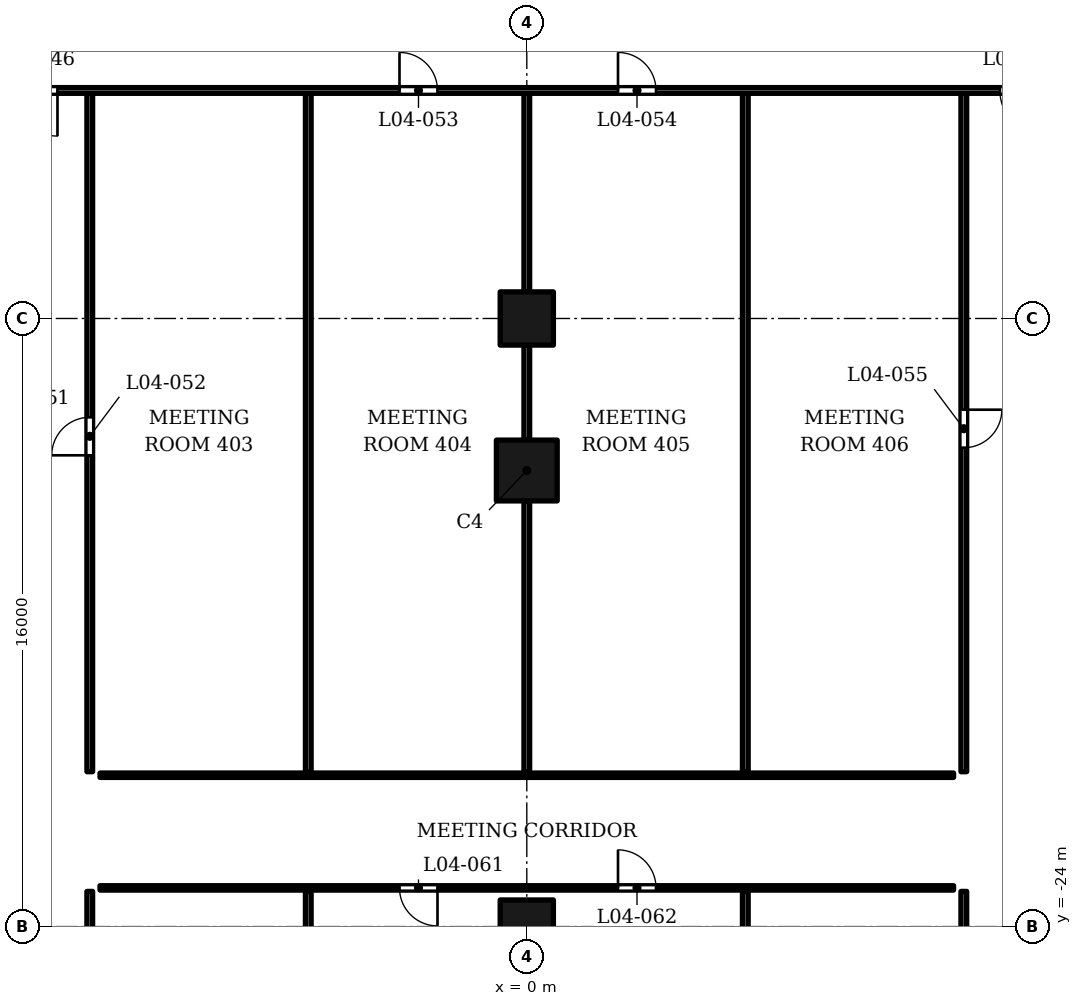
"""IFC4 building model, lengths in metres.
Left out: names, types, materials, properties, quantities, classifications, styles, units other than length and angle.
Written with IfcOpenShell. Run it as: python <this file> out.ifc"""

import sys

from ifc_helpers import new_model, si_unit, direction, frame, frame_2d, origin, origin_2d, place, context, subcontext, project, spatial, rectangle, extrude, element, fill, save


model = new_model("IFC4")
c1 = context("Model", 3, precision=1e-05, world=origin(), true_north=direction((0.0, 1.0)))
c2 = subcontext(c1, "Body", "Model", "MODEL_VIEW")
j1 = project(units=[si_unit("LENGTHUNIT", "METRE"), si_unit("PLANEANGLEUNIT", "RADIAN")], contexts=[c1])
p1 = place(None, origin())
s1 = spatial("IfcSite", under=j1, at=p1, CompositionType="ELEMENT")
p2 = place(p1, origin())
s2 = spatial("IfcBuilding", under=s1, at=p2, CompositionType="ELEMENT")
p3 = place(p2, frame((0.0, 0.0, 34.5)))
s3 = spatial("IfcBuildingStorey", under=s2, at=p3, CompositionType="ELEMENT", Elevation=34.5)
for number, where, z_axis, x_axis in (
    (1, (0.0, -24.0, 0.0), (0.0, 0.0, 1.0), (1.0, 0.0, 0.0)),
    (2, (0.0, -8.0, 0.0), (0.0, 0.0, 1.0), (1.0, 0.0, 0.0)),
):
    element("IfcColumn", number, at=place(p3, frame(where, z_axis=z_axis, x_axis=x_axis)), inside=s3, PredefinedType="COLUMN", context=c2, shape_type="SweptSolid", body=[
        extrude(rectangle(XDim=1.4, YDim=1.4, at=origin_2d()), origin(), (0.0, 0.0, 1.0), 5.5),
    ])
p4 = place(p3, frame((0.0, -12.0, 0.0), z_axis=(0.0, 0.0, 1.0), x_axis=(1.0, 0.0, 0.0)))
e3 = element("IfcColumn", 3, at=p4, inside=s3, PredefinedType="COLUMN", context=c2, shape_type="SweptSolid", body=[
    extrude(rectangle(XDim=1.6, YDim=1.6, at=origin_2d()), origin(), (0.0, 0.0, 1.0), 5.5),
])
p5 = place(p3, frame((-11.5, -43.72, 0.0), z_axis=(0.0, 0.0, 1.0), x_axis=(0.0, 1.0, 0.0)))
e4 = element("IfcWall", 4, at=p5, inside=s3, PredefinedType="PARTITIONING", context=c2, shape_type="SweptSolid", body=[
    extrude(rectangle(XDim=20.645, YDim=0.15, at=frame_2d((10.323, 0.0))), origin(), (0.0, 0.0, 1.0), 3.85),
])
p6 = place(p5, frame((9.87, 0.0, 0.0)))
e5 = element("IfcOpeningElement", 5, at=p6, cuts=e4, PredefinedType="OPENING", context=c2, shape_type="SweptSolid", body=[
    extrude(rectangle(XDim=1.0, YDim=2.1, at=frame_2d((0.5, 1.05))), frame((0.0, 0.085, 0.0), z_axis=(0.0, -1.0, 0.0), x_axis=(1.0, 0.0, 0.0)), (0.0, 0.0, 1.0), 0.17),
])
for number, where, z_axis, x_axis in (
    (6, (-5.75, -43.72, 0.0), (0.0, 0.0, 1.0), (0.0, 1.0, 0.0)),
    (7, (5.75, -43.72, 0.0), (0.0, 0.0, 1.0), (0.0, 1.0, 0.0)),
):
    element("IfcWall", number, at=place(p3, frame(where, z_axis=z_axis, x_axis=x_axis)), inside=s3, PredefinedType="PARTITIONING", context=c2, shape_type="SweptSolid", body=[
        extrude(rectangle(XDim=20.645, YDim=0.15, at=frame_2d((10.323, 0.0))), origin(), (0.0, 0.0, 1.0), 3.85),
    ])
p7 = place(p3, frame((11.5, -43.72, 0.0), z_axis=(0.0, 0.0, 1.0), x_axis=(0.0, 1.0, 0.0)))
e8 = element("IfcWall", 8, at=p7, inside=s3, PredefinedType="PARTITIONING", context=c2, shape_type="SweptSolid", body=[
    extrude(rectangle(XDim=20.645, YDim=0.15, at=frame_2d((10.323, 0.0))), origin(), (0.0, 0.0, 1.0), 3.85),
])
p8 = place(p7, frame((9.82, 0.0, 0.0)))
e9 = element("IfcOpeningElement", 9, at=p8, cuts=e8, PredefinedType="OPENING", context=c2, shape_type="SweptSolid", body=[
    extrude(rectangle(XDim=1.0, YDim=2.1, at=frame_2d((0.5, 1.05))), frame((0.0, 0.085, 0.0), z_axis=(0.0, -1.0, 0.0), x_axis=(1.0, 0.0, 0.0)), (0.0, 0.0, 1.0), 0.17),
])
p9 = place(p3, frame((-11.23, -22.982, 0.0), z_axis=(0.0, 0.0, 1.0), x_axis=(1.0, 0.0, 0.0)))
e10 = element("IfcWall", 10, at=p9, inside=s3, PredefinedType="PARTITIONING", context=c2, shape_type="SweptSolid", body=[
    extrude(rectangle(XDim=22.46, YDim=0.115, at=frame_2d((11.23, 0.0))), origin(), (0.0, 0.0, 1.0), 3.85),
])
p10 = place(p9, frame((7.88, 0.0, 0.0)))
e11 = element("IfcOpeningElement", 11, at=p10, cuts=e10, PredefinedType="OPENING", context=c2, shape_type="SweptSolid", body=[
    extrude(rectangle(XDim=1.0, YDim=2.1, at=frame_2d((0.5, 1.05))), frame((0.0, 0.067, 0.0), z_axis=(0.0, -1.0, 0.0), x_axis=(1.0, 0.0, 0.0)), (0.0, 0.0, 1.0), 0.135),
])
p11 = place(p9, frame((13.63, 0.0, 0.0)))
e12 = element("IfcOpeningElement", 12, at=p11, cuts=e10, PredefinedType="OPENING", context=c2, shape_type="SweptSolid", body=[
    extrude(rectangle(XDim=1.0, YDim=2.1, at=frame_2d((0.5, 1.05))), frame((0.0, 0.067, 0.0), z_axis=(0.0, -1.0, 0.0), x_axis=(1.0, 0.0, 0.0)), (0.0, 0.0, 1.0), 0.135),
])
p12 = place(p3, frame((-11.23, -20.018, 0.0), z_axis=(0.0, 0.0, 1.0), x_axis=(1.0, 0.0, 0.0)))
e13 = element("IfcWall", 13, at=p12, inside=s3, PredefinedType="PARTITIONING", context=c2, shape_type="SweptSolid", body=[
    extrude(rectangle(XDim=22.46, YDim=0.115, at=frame_2d((11.23, 0.0))), origin(), (0.0, 0.0, 1.0), 3.85),
])
p13 = place(p3, frame((-11.5, -19.925, 0.0), z_axis=(0.0, 0.0, 1.0), x_axis=(0.0, 1.0, 0.0)))
e14 = element("IfcWall", 14, at=p13, inside=s3, PredefinedType="PARTITIONING", context=c2, shape_type="SweptSolid", body=[
    extrude(rectangle(XDim=17.85, YDim=0.15, at=frame_2d((8.925, 0.0))), origin(), (0.0, 0.0, 1.0), 3.85),
])
p14 = place(p13, frame((8.325, 0.0, 0.0)))
e15 = element("IfcOpeningElement", 15, at=p14, cuts=e14, PredefinedType="OPENING", context=c2, shape_type="SweptSolid", body=[
    extrude(rectangle(XDim=1.0, YDim=2.1, at=frame_2d((0.5, 1.05))), frame((0.0, 0.085, 0.0), z_axis=(0.0, -1.0, 0.0), x_axis=(1.0, 0.0, 0.0)), (0.0, 0.0, 1.0), 0.17),
])
p15 = place(p3, frame((-5.75, -19.925, 0.0), z_axis=(0.0, 0.0, 1.0), x_axis=(0.0, 1.0, 0.0)))
e16 = element("IfcWall", 16, at=p15, inside=s3, PredefinedType="PARTITIONING", context=c2, shape_type="SweptSolid", body=[
    extrude(rectangle(XDim=17.85, YDim=0.15, at=frame_2d((8.925, 0.0))), origin(), (0.0, 0.0, 1.0), 3.85),
])
p16 = place(p3, frame((0.0, -19.925, 0.0), z_axis=(0.0, 0.0, 1.0), x_axis=(0.0, 1.0, 0.0)))
e17 = element("IfcWall", 17, at=p16, inside=s3, PredefinedType="PARTITIONING", context=c2, shape_type="SweptSolid", body=[
    extrude(rectangle(XDim=7.125, YDim=0.15, at=frame_2d((3.562, 0.0))), origin(), (0.0, 0.0, 1.0), 3.85),
])
p17 = place(p3, frame((5.75, -19.925, 0.0), z_axis=(0.0, 0.0, 1.0), x_axis=(0.0, 1.0, 0.0)))
e18 = element("IfcWall", 18, at=p17, inside=s3, PredefinedType="PARTITIONING", context=c2, shape_type="SweptSolid", body=[
    extrude(rectangle(XDim=17.85, YDim=0.15, at=frame_2d((8.925, 0.0))), origin(), (0.0, 0.0, 1.0), 3.85),
])
p18 = place(p3, frame((11.5, -19.925, 0.0), z_axis=(0.0, 0.0, 1.0), x_axis=(0.0, 1.0, 0.0)))
e19 = element("IfcWall", 19, at=p18, inside=s3, PredefinedType="PARTITIONING", context=c2, shape_type="SweptSolid", body=[
    extrude(rectangle(XDim=17.85, YDim=0.15, at=frame_2d((8.925, 0.0))), origin(), (0.0, 0.0, 1.0), 3.85),
])
p19 = place(p18, frame((8.525, 0.0, 0.0)))
e20 = element("IfcOpeningElement", 20, at=p19, cuts=e19, PredefinedType="OPENING", context=c2, shape_type="SweptSolid", body=[
    extrude(rectangle(XDim=1.0, YDim=2.1, at=frame_2d((0.5, 1.05))), frame((0.0, 0.085, 0.0), z_axis=(0.0, -1.0, 0.0), x_axis=(1.0, 0.0, 0.0)), (0.0, 0.0, 1.0), 0.17),
])
p20 = place(p3, frame((0.0, -11.2, 0.0), z_axis=(0.0, 0.0, 1.0), x_axis=(0.0, 1.0, 0.0)))
e21 = element("IfcWall", 21, at=p20, inside=s3, PredefinedType="PARTITIONING", context=c2, shape_type="SweptSolid", body=[
    extrude(rectangle(XDim=2.5, YDim=0.15, at=frame_2d((1.25, 0.0))), origin(), (0.0, 0.0, 1.0), 3.85),
])
p21 = place(p3, frame((0.0, -7.3, 0.0), z_axis=(0.0, 0.0, 1.0), x_axis=(0.0, 1.0, 0.0)))
e22 = element("IfcWall", 22, at=p21, inside=s3, PredefinedType="PARTITIONING", context=c2, shape_type="SweptSolid", body=[
    extrude(rectangle(XDim=5.225, YDim=0.15, at=frame_2d((2.613, 0.0))), origin(), (0.0, 0.0, 1.0), 5.05),
])
p22 = place(p3, frame((-33.46, -2.0, 0.0), z_axis=(0.0, 0.0, 1.0), x_axis=(1.0, 0.0, 0.0)))
e23 = element("IfcWall", 23, at=p22, inside=s3, PredefinedType="PARTITIONING", context=c2, shape_type="SweptSolid", body=[
    extrude(rectangle(XDim=66.92, YDim=0.15, at=frame_2d((33.46, 0.0))), origin(), (0.0, 0.0, 1.0), 3.85),
])
p23 = place(p22, frame((19.91, 0.0, 0.0)))
e24 = element("IfcOpeningElement", 24, at=p23, cuts=e23, PredefinedType="OPENING", context=c2, shape_type="SweptSolid", body=[
    extrude(rectangle(XDim=1.2, YDim=2.1, at=frame_2d((0.6, 1.05))), frame((0.0, 0.085, 0.0), z_axis=(0.0, -1.0, 0.0), x_axis=(1.0, 0.0, 0.0)), (0.0, 0.0, 1.0), 0.17),
])
p24 = place(p22, frame((45.91, 0.0, 0.0)))
e25 = element("IfcOpeningElement", 25, at=p24, cuts=e23, PredefinedType="OPENING", context=c2, shape_type="SweptSolid", body=[
    extrude(rectangle(XDim=1.2, YDim=2.1, at=frame_2d((0.6, 1.05))), frame((0.0, 0.085, 0.0), z_axis=(0.0, -1.0, 0.0), x_axis=(1.0, 0.0, 0.0)), (0.0, 0.0, 1.0), 0.17),
])
p25 = place(p22, frame((30.11, 0.0, 0.0)))
e26 = element("IfcOpeningElement", 26, at=p25, cuts=e23, PredefinedType="OPENING", context=c2, shape_type="SweptSolid", body=[
    extrude(rectangle(XDim=1.0, YDim=2.1, at=frame_2d((0.5, 1.05))), frame((0.0, 0.085, 0.0), z_axis=(0.0, -1.0, 0.0), x_axis=(1.0, 0.0, 0.0)), (0.0, 0.0, 1.0), 0.17),
])
p26 = place(p22, frame((35.86, 0.0, 0.0)))
e27 = element("IfcOpeningElement", 27, at=p26, cuts=e23, PredefinedType="OPENING", context=c2, shape_type="SweptSolid", body=[
    extrude(rectangle(XDim=1.0, YDim=2.1, at=frame_2d((0.5, 1.05))), frame((0.0, 0.085, 0.0), z_axis=(0.0, -1.0, 0.0), x_axis=(1.0, 0.0, 0.0)), (0.0, 0.0, 1.0), 0.17),
])
p27 = place(p23, origin())
e28 = element("IfcDoor", 28, at=p27, inside=s3, OperationType="SINGLE_SWING_RIGHT", PredefinedType="DOOR", context=c2, shape_type="SweptSolid", body=[
    extrude(rectangle(XDim=1.2, YDim=2.1, at=frame_2d((0.6, 1.05))), frame((0.0, 0.025, 0.0), z_axis=(0.0, -1.0, 0.0), x_axis=(1.0, 0.0, 0.0)), (0.0, 0.0, 1.0), 0.05),
])
fill(e24, e28)
p28 = place(p24, origin())
e29 = element("IfcDoor", 29, at=p28, inside=s3, OperationType="SINGLE_SWING_RIGHT", PredefinedType="DOOR", context=c2, shape_type="SweptSolid", body=[
    extrude(rectangle(XDim=1.2, YDim=2.1, at=frame_2d((0.6, 1.05))), frame((0.0, 0.025, 0.0), z_axis=(0.0, -1.0, 0.0), x_axis=(1.0, 0.0, 0.0)), (0.0, 0.0, 1.0), 0.05),
])
fill(e25, e29)
p29 = place(p14, origin())
e30 = element("IfcDoor", 30, at=p29, inside=s3, OperationType="SINGLE_SWING_LEFT", PredefinedType="DOOR", context=c2, shape_type="SweptSolid", body=[
    extrude(rectangle(XDim=1.0, YDim=2.1, at=frame_2d((0.5, 1.05))), frame((0.0, 0.025, 0.0), z_axis=(0.0, -1.0, 0.0), x_axis=(1.0, 0.0, 0.0)), (0.0, 0.0, 1.0), 0.05),
])
fill(e15, e30)
p30 = place(p25, origin())
e31 = element("IfcDoor", 31, at=p30, inside=s3, OperationType="SINGLE_SWING_LEFT", PredefinedType="DOOR", context=c2, shape_type="SweptSolid", body=[
    extrude(rectangle(XDim=1.0, YDim=2.1, at=frame_2d((0.5, 1.05))), frame((0.0, 0.025, 0.0), z_axis=(0.0, -1.0, 0.0), x_axis=(1.0, 0.0, 0.0)), (0.0, 0.0, 1.0), 0.05),
])
fill(e26, e31)
p31 = place(p26, origin())
e32 = element("IfcDoor", 32, at=p31, inside=s3, OperationType="SINGLE_SWING_LEFT", PredefinedType="DOOR", context=c2, shape_type="SweptSolid", body=[
    extrude(rectangle(XDim=1.0, YDim=2.1, at=frame_2d((0.5, 1.05))), frame((0.0, 0.025, 0.0), z_axis=(0.0, -1.0, 0.0), x_axis=(1.0, 0.0, 0.0)), (0.0, 0.0, 1.0), 0.05),
])
fill(e27, e32)
p32 = place(p19, origin())
e33 = element("IfcDoor", 33, at=p32, inside=s3, OperationType="SINGLE_SWING_RIGHT", PredefinedType="DOOR", context=c2, shape_type="SweptSolid", body=[
    extrude(rectangle(XDim=1.0, YDim=2.1, at=frame_2d((0.5, 1.05))), frame((0.0, 0.025, 0.0), z_axis=(0.0, -1.0, 0.0), x_axis=(1.0, 0.0, 0.0)), (0.0, 0.0, 1.0), 0.05),
])
fill(e20, e33)
p33 = place(p10, origin())
e34 = element("IfcDoor", 34, at=p33, inside=s3, OperationType="SINGLE_SWING_RIGHT", PredefinedType="DOOR", context=c2, shape_type="SweptSolid", body=[
    extrude(rectangle(XDim=1.0, YDim=2.1, at=frame_2d((0.5, 1.05))), frame((0.0, 0.025, 0.0), z_axis=(0.0, -1.0, 0.0), x_axis=(1.0, 0.0, 0.0)), (0.0, 0.0, 1.0), 0.05),
])
fill(e11, e34)
p34 = place(p11, origin())
e35 = element("IfcDoor", 35, at=p34, inside=s3, OperationType="SINGLE_SWING_LEFT", PredefinedType="DOOR", context=c2, shape_type="SweptSolid", body=[
    extrude(rectangle(XDim=1.0, YDim=2.1, at=frame_2d((0.5, 1.05))), frame((0.0, 0.025, 0.0), z_axis=(0.0, -1.0, 0.0), x_axis=(1.0, 0.0, 0.0)), (0.0, 0.0, 1.0), 0.05),
])
fill(e12, e35)
save(model, sys.argv[1])
